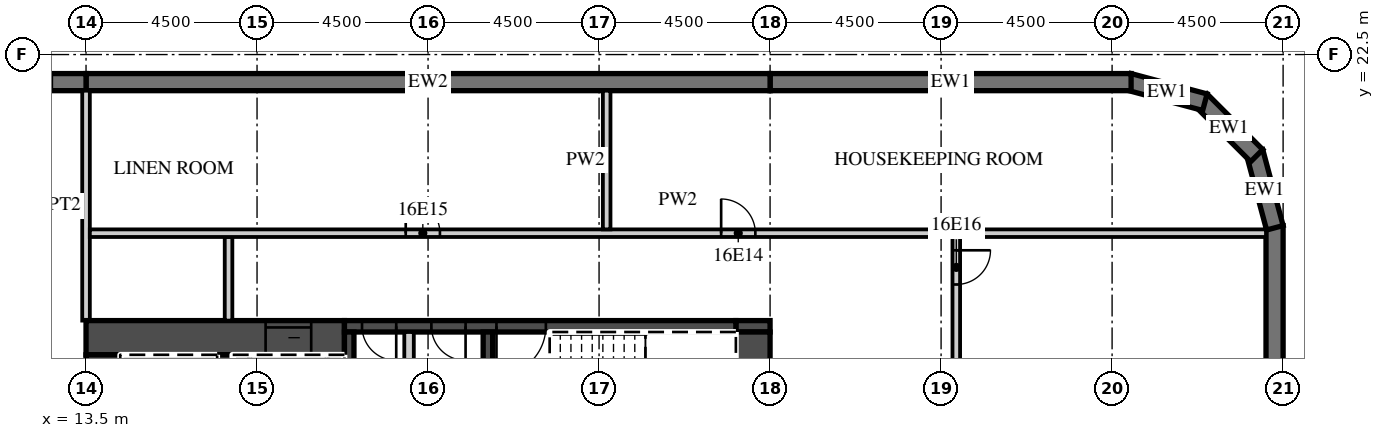
"""IFC4 building model, lengths in metres.
Left out: names, types, materials, properties, quantities, classifications, styles, units other than length and angle.
Written with IfcOpenShell. Run it as: python <this file> out.ifc"""

import sys

from ifc_helpers import new_model, si_unit, direction, frame, frame_2d, origin, place, context, subcontext, project, spatial, polyline, rectangle, outline, extrude, element, fill, save


model = new_model("IFC4")
c1 = context("Model", 3, precision=1e-05, world=origin(), true_north=direction((0.0, 1.0)))
c2 = subcontext(c1, "Body", "Model", "MODEL_VIEW")
j1 = project(units=[si_unit("LENGTHUNIT", "METRE"), si_unit("PLANEANGLEUNIT", "RADIAN")], contexts=[c1])
p1 = place(None, origin())
s1 = spatial("IfcSite", under=j1, at=p1, CompositionType="ELEMENT")
p2 = place(p1, origin())
s2 = spatial("IfcBuilding", under=s1, at=p2, CompositionType="ELEMENT")
p3 = place(p2, frame((0.0, 0.0, 83.1)))
s3 = spatial("IfcBuildingStorey", under=s2, at=p3, CompositionType="ELEMENT", Elevation=83.1)
p4 = place(p3, frame((44.775, -18.0, 0.0), z_axis=(0.0, 0.0, 1.0), x_axis=(0.0, 1.0, 0.0)))
e1 = element("IfcWall", 1, at=p4, inside=s3, PredefinedType="SOLIDWALL", context=c2, shape_type="SweptSolid", body=[
    extrude(rectangle(XDim=36.0, YDim=0.45, at=frame_2d((18.0, 0.0))), origin(), (0.0, 0.0, 1.0), 3.02),
])
p5 = place(p4, frame((3.9, 0.0, 0.45)))
e2 = element("IfcOpeningElement", 2, at=p5, cuts=e1, PredefinedType="OPENING", context=c2, shape_type="SweptSolid", body=[
    extrude(rectangle(XDim=3.3, YDim=2.25, at=frame_2d((1.65, 1.125))), frame((0.0, 0.235, 0.0), z_axis=(0.0, -1.0, 0.0), x_axis=(1.0, 0.0, 0.0)), (0.0, 0.0, 1.0), 0.47),
])
p6 = place(p4, frame((8.4, 0.0, 0.45)))
e3 = element("IfcOpeningElement", 3, at=p6, cuts=e1, PredefinedType="OPENING", context=c2, shape_type="SweptSolid", body=[
    extrude(rectangle(XDim=3.3, YDim=2.25, at=frame_2d((1.65, 1.125))), frame((0.0, 0.235, 0.0), z_axis=(0.0, -1.0, 0.0), x_axis=(1.0, 0.0, 0.0)), (0.0, 0.0, 1.0), 0.47),
])
p7 = place(p4, frame((12.9, 0.0, 0.45)))
e4 = element("IfcOpeningElement", 4, at=p7, cuts=e1, PredefinedType="OPENING", context=c2, shape_type="SweptSolid", body=[
    extrude(rectangle(XDim=3.3, YDim=2.25, at=frame_2d((1.65, 1.125))), frame((0.0, 0.235, 0.0), z_axis=(0.0, -1.0, 0.0), x_axis=(1.0, 0.0, 0.0)), (0.0, 0.0, 1.0), 0.47),
])
p8 = place(p3, frame((44.783, 17.942, 0.0), z_axis=(0.0, 0.0, 1.0), x_axis=(-0.25881466832, 0.965926999034, 0.0)))
e5 = element("IfcWall", 5, at=p8, inside=s3, PredefinedType="SOLIDWALL", context=c2, shape_type="SweptSolid", body=[
    extrude(outline(polyline([(0.0, -0.225), (2.071, -0.225), (1.95, 0.225), (0.121, 0.225), (0.0, -0.225)])), origin(), (0.0, 0.0, 1.0), 3.02),
])
p9 = place(p3, frame((44.305, 19.841, 0.0), z_axis=(0.0, 0.0, 1.0), x_axis=(-0.707106781187, 0.707106781187, 0.0)))
e6 = element("IfcWall", 6, at=p9, inside=s3, PredefinedType="SOLIDWALL", context=c2, shape_type="SweptSolid", body=[
    extrude(outline(polyline([(0.0, -0.225), (2.071, -0.225), (1.95, 0.225), (0.121, 0.225), (0.0, -0.225)])), origin(), (0.0, 0.0, 1.0), 3.02),
])
p10 = place(p3, frame((42.942, 21.247, 0.0), z_axis=(0.0, 0.0, 1.0), x_axis=(-0.965926999034, 0.25881466832, 0.0)))
e7 = element("IfcWall", 7, at=p10, inside=s3, PredefinedType="SOLIDWALL", context=c2, shape_type="SweptSolid", body=[
    extrude(outline(polyline([(-0.0, -0.225), (2.07, -0.225), (1.95, 0.225), (0.12, 0.225), (-0.0, -0.225)])), origin(), (0.0, 0.0, 1.0), 3.02),
])
p11 = place(p3, frame((41.0, 21.775, 0.0), z_axis=(0.0, 0.0, 1.0), x_axis=(-1.0, 0.0, 0.0)))
e8 = element("IfcWall", 8, at=p11, inside=s3, PredefinedType="SOLIDWALL", context=c2, shape_type="SweptSolid", body=[
    extrude(rectangle(XDim=9.5, YDim=0.45, at=frame_2d((4.75, 0.0))), origin(), (0.0, 0.0, 1.0), 3.02),
])
p12 = place(p3, frame((31.5, 21.775, 0.0), z_axis=(0.0, 0.0, 1.0), x_axis=(-1.0, 0.0, 0.0)))
e9 = element("IfcWall", 9, at=p12, inside=s3, PredefinedType="SOLIDWALL", context=c2, shape_type="SweptSolid", body=[
    extrude(rectangle(XDim=18.0, YDim=0.45, at=frame_2d((9.0, 0.0))), origin(), (0.0, 0.0, 1.0), 3.02),
])
p13 = place(p3, frame((13.5, 21.775, 0.0), z_axis=(0.0, 0.0, 1.0), x_axis=(-1.0, 0.0, 0.0)))
e10 = element("IfcWall", 10, at=p13, inside=s3, PredefinedType="SOLIDWALL", context=c2, shape_type="SweptSolid", body=[
    extrude(rectangle(XDim=54.5, YDim=0.45, at=frame_2d((27.25, 0.0))), origin(), (0.0, 0.0, 1.0), 3.02),
])
p14 = place(p13, frame((0.9, 0.0, 0.45)))
e11 = element("IfcOpeningElement", 11, at=p14, cuts=e10, PredefinedType="OPENING", context=c2, shape_type="SweptSolid", body=[
    extrude(rectangle(XDim=2.7, YDim=2.25, at=frame_2d((1.35, 1.125))), frame((0.0, 0.235, 0.0), z_axis=(0.0, -1.0, 0.0), x_axis=(1.0, 0.0, 0.0)), (0.0, 0.0, 1.0), 0.47),
])
p15 = place(p13, frame((5.4, 0.0, 0.45)))
e12 = element("IfcOpeningElement", 12, at=p15, cuts=e10, PredefinedType="OPENING", context=c2, shape_type="SweptSolid", body=[
    extrude(rectangle(XDim=2.7, YDim=2.25, at=frame_2d((1.35, 1.125))), frame((0.0, 0.235, 0.0), z_axis=(0.0, -1.0, 0.0), x_axis=(1.0, 0.0, 0.0)), (0.0, 0.0, 1.0), 0.47),
])
p16 = place(p13, frame((9.9, 0.0, 0.45)))
e13 = element("IfcOpeningElement", 13, at=p16, cuts=e10, PredefinedType="OPENING", context=c2, shape_type="SweptSolid", body=[
    extrude(rectangle(XDim=2.7, YDim=2.25, at=frame_2d((1.35, 1.125))), frame((0.0, 0.235, 0.0), z_axis=(0.0, -1.0, 0.0), x_axis=(1.0, 0.0, 0.0)), (0.0, 0.0, 1.0), 0.47),
])
p17 = place(p13, frame((14.4, 0.0, 0.45)))
e14 = element("IfcOpeningElement", 14, at=p17, cuts=e10, PredefinedType="OPENING", context=c2, shape_type="SweptSolid", body=[
    extrude(rectangle(XDim=2.7, YDim=2.25, at=frame_2d((1.35, 1.125))), frame((0.0, 0.235, 0.0), z_axis=(0.0, -1.0, 0.0), x_axis=(1.0, 0.0, 0.0)), (0.0, 0.0, 1.0), 0.47),
])
p18 = place(p13, frame((18.9, 0.0, 0.45)))
e15 = element("IfcOpeningElement", 15, at=p18, cuts=e10, PredefinedType="OPENING", context=c2, shape_type="SweptSolid", body=[
    extrude(rectangle(XDim=2.7, YDim=2.25, at=frame_2d((1.35, 1.125))), frame((0.0, 0.235, 0.0), z_axis=(0.0, -1.0, 0.0), x_axis=(1.0, 0.0, 0.0)), (0.0, 0.0, 1.0), 0.47),
])
p19 = place(p13, frame((23.4, 0.0, 0.45)))
e16 = element("IfcOpeningElement", 16, at=p19, cuts=e10, PredefinedType="OPENING", context=c2, shape_type="SweptSolid", body=[
    extrude(rectangle(XDim=2.7, YDim=2.25, at=frame_2d((1.35, 1.125))), frame((0.0, 0.235, 0.0), z_axis=(0.0, -1.0, 0.0), x_axis=(1.0, 0.0, 0.0)), (0.0, 0.0, 1.0), 0.47),
])
p20 = place(p13, frame((27.9, 0.0, 0.45)))
e17 = element("IfcOpeningElement", 17, at=p20, cuts=e10, PredefinedType="OPENING", context=c2, shape_type="SweptSolid", body=[
    extrude(rectangle(XDim=2.7, YDim=2.25, at=frame_2d((1.35, 1.125))), frame((0.0, 0.235, 0.0), z_axis=(0.0, -1.0, 0.0), x_axis=(1.0, 0.0, 0.0)), (0.0, 0.0, 1.0), 0.47),
])
p21 = place(p13, frame((32.4, 0.0, 0.45)))
e18 = element("IfcOpeningElement", 18, at=p21, cuts=e10, PredefinedType="OPENING", context=c2, shape_type="SweptSolid", body=[
    extrude(rectangle(XDim=2.7, YDim=2.25, at=frame_2d((1.35, 1.125))), frame((0.0, 0.235, 0.0), z_axis=(0.0, -1.0, 0.0), x_axis=(1.0, 0.0, 0.0)), (0.0, 0.0, 1.0), 0.47),
])
p22 = place(p13, frame((36.9, 0.0, 0.45)))
e19 = element("IfcOpeningElement", 19, at=p22, cuts=e10, PredefinedType="OPENING", context=c2, shape_type="SweptSolid", body=[
    extrude(rectangle(XDim=2.7, YDim=2.25, at=frame_2d((1.35, 1.125))), frame((0.0, 0.235, 0.0), z_axis=(0.0, -1.0, 0.0), x_axis=(1.0, 0.0, 0.0)), (0.0, 0.0, 1.0), 0.47),
])
p23 = place(p13, frame((41.4, 0.0, 0.45)))
e20 = element("IfcOpeningElement", 20, at=p23, cuts=e10, PredefinedType="OPENING", context=c2, shape_type="SweptSolid", body=[
    extrude(rectangle(XDim=2.7, YDim=2.25, at=frame_2d((1.35, 1.125))), frame((0.0, 0.235, 0.0), z_axis=(0.0, -1.0, 0.0), x_axis=(1.0, 0.0, 0.0)), (0.0, 0.0, 1.0), 0.47),
])
p24 = place(p13, frame((45.9, 0.0, 0.45)))
e21 = element("IfcOpeningElement", 21, at=p24, cuts=e10, PredefinedType="OPENING", context=c2, shape_type="SweptSolid", body=[
    extrude(rectangle(XDim=2.7, YDim=2.25, at=frame_2d((1.35, 1.125))), frame((0.0, 0.235, 0.0), z_axis=(0.0, -1.0, 0.0), x_axis=(1.0, 0.0, 0.0)), (0.0, 0.0, 1.0), 0.47),
])
p25 = place(p13, frame((50.4, 0.0, 0.45)))
e22 = element("IfcOpeningElement", 22, at=p25, cuts=e10, PredefinedType="OPENING", context=c2, shape_type="SweptSolid", body=[
    extrude(rectangle(XDim=2.7, YDim=2.25, at=frame_2d((1.35, 1.125))), frame((0.0, 0.235, 0.0), z_axis=(0.0, -1.0, 0.0), x_axis=(1.0, 0.0, 0.0)), (0.0, 0.0, 1.0), 0.47),
])
p26 = place(p3, frame((13.5, 15.5, 0.0), z_axis=(0.0, 0.0, 1.0), x_axis=(0.0, 1.0, 0.0)))
e23 = element("IfcWall", 23, at=p26, inside=s3, PredefinedType="PARTITIONING", context=c2, shape_type="SweptSolid", body=[
    extrude(rectangle(XDim=6.05, YDim=0.2, at=frame_2d((3.025, 0.0))), origin(), (0.0, 0.0, 1.0), 3.02),
])
p27 = place(p3, frame((13.5, 15.05, 0.0), z_axis=(0.0, 0.0, 1.0), x_axis=(1.0, 0.0, 0.0)))
e24 = element("IfcWall", 24, at=p27, inside=s3, PredefinedType="SHEAR", context=c2, shape_type="SweptSolid", body=[
    extrude(rectangle(XDim=6.8, YDim=0.9, at=frame_2d((3.4, 0.0))), origin(), (0.0, 0.0, 1.0), 3.02),
])
p28 = place(p27, frame((4.725, 0.0, 0.0)))
e25 = element("IfcOpeningElement", 25, at=p28, cuts=e24, PredefinedType="OPENING", context=c2, shape_type="SweptSolid", body=[
    extrude(rectangle(XDim=1.2, YDim=2.1, at=frame_2d((0.6, 1.05))), frame((0.0, 0.46, 0.0), z_axis=(0.0, -1.0, 0.0), x_axis=(1.0, 0.0, 0.0)), (0.0, 0.0, 1.0), 0.92),
])
p29 = place(p3, frame((30.6, 15.35, 0.0), z_axis=(0.0, 0.0, 1.0), x_axis=(1.0, 0.0, 0.0)))
e26 = element("IfcWall", 26, at=p29, inside=s3, PredefinedType="SHEAR", context=c2, shape_type="SweptSolid", body=[
    extrude(rectangle(XDim=0.9, YDim=0.3, at=frame_2d((0.45, 0.0))), origin(), (0.0, 0.0, 1.0), 3.02),
])
p30 = place(p3, frame((20.3, 15.35, 0.0), z_axis=(0.0, 0.0, 1.0), x_axis=(1.0, 0.0, 0.0)))
e27 = element("IfcWall", 27, at=p30, inside=s3, PredefinedType="SHEAR", context=c2, shape_type="SweptSolid", body=[
    extrude(rectangle(XDim=10.3, YDim=0.3, at=frame_2d((5.15, 0.0))), origin(), (0.0, 0.0, 1.0), 3.02),
])
p31 = place(p30, frame((4.0, 0.0, 0.0)))
e28 = element("IfcOpeningElement", 28, at=p31, cuts=e27, PredefinedType="OPENING", context=c2, shape_type="SweptSolid", body=[
    extrude(rectangle(XDim=1.3, YDim=2.1, at=frame_2d((0.65, 1.05))), frame((0.0, 0.16, 0.0), z_axis=(0.0, -1.0, 0.0), x_axis=(1.0, 0.0, 0.0)), (0.0, 0.0, 1.0), 0.32),
])
p32 = place(p30, frame((2.288, 0.0, 0.0)))
e29 = element("IfcOpeningElement", 29, at=p32, cuts=e27, PredefinedType="OPENING", context=c2, shape_type="SweptSolid", body=[
    extrude(rectangle(XDim=0.9, YDim=2.1, at=frame_2d((0.45, 1.05))), frame((0.0, 0.16, 0.0), z_axis=(0.0, -1.0, 0.0), x_axis=(1.0, 0.0, 0.0)), (0.0, 0.0, 1.0), 0.32),
])
p33 = place(p30, frame((0.462, 0.0, 0.0)))
e30 = element("IfcOpeningElement", 30, at=p33, cuts=e27, PredefinedType="OPENING", context=c2, shape_type="SweptSolid", body=[
    extrude(rectangle(XDim=0.9, YDim=2.1, at=frame_2d((0.45, 1.05))), frame((0.0, 0.16, 0.0), z_axis=(0.0, -1.0, 0.0), x_axis=(1.0, 0.0, 0.0)), (0.0, 0.0, 1.0), 0.32),
])
p34 = place(p3, frame((31.05, 2.4, 0.0), z_axis=(0.0, 0.0, 1.0), x_axis=(0.0, 1.0, 0.0)))
e31 = element("IfcWall", 31, at=p34, inside=s3, PredefinedType="SHEAR", context=c2, shape_type="SweptSolid", body=[
    extrude(rectangle(XDim=12.8, YDim=0.9, at=frame_2d((6.4, 0.0))), origin(), (0.0, 0.0, 1.0), 3.02),
])
p35 = place(p34, frame((0.2, 0.0, 0.0)))
e32 = element("IfcOpeningElement", 32, at=p35, cuts=e31, PredefinedType="OPENING", context=c2, shape_type="SweptSolid", body=[
    extrude(rectangle(XDim=1.1, YDim=2.1, at=frame_2d((0.55, 1.05))), frame((0.0, 0.46, 0.0), z_axis=(0.0, -1.0, 0.0), x_axis=(1.0, 0.0, 0.0)), (0.0, 0.0, 1.0), 0.92),
])
p36 = place(p3, frame((13.95, 2.4, 0.0), z_axis=(0.0, 0.0, 1.0), x_axis=(0.0, 1.0, 0.0)))
e33 = element("IfcWall", 33, at=p36, inside=s3, PredefinedType="SHEAR", context=c2, shape_type="SweptSolid", body=[
    extrude(rectangle(XDim=12.2, YDim=0.9, at=frame_2d((6.1, 0.0))), origin(), (0.0, 0.0, 1.0), 3.02),
])
p37 = place(p3, frame((17.15, 8.8, 0.0), z_axis=(0.0, 0.0, 1.0), x_axis=(0.0, 1.0, 0.0)))
e34 = element("IfcWall", 34, at=p37, inside=s3, PredefinedType="SHEAR", context=c2, shape_type="SweptSolid", body=[
    extrude(rectangle(XDim=5.8, YDim=0.4, at=frame_2d((2.9, 0.0))), origin(), (0.0, 0.0, 1.0), 3.02),
])
for number, where, z_axis, x_axis in (
    (35, (20.425, 11.95, 0.0), (0.0, 0.0, 1.0), (0.0, 1.0, 0.0)),
    (36, (24.075, 11.95, 0.0), (0.0, 0.0, 1.0), (0.0, 1.0, 0.0)),
):
    element("IfcWall", number, at=place(p3, frame(where, z_axis=z_axis, x_axis=x_axis)), inside=s3, PredefinedType="SHEAR", context=c2, shape_type="SweptSolid", body=[
        extrude(rectangle(XDim=3.25, YDim=0.25, at=frame_2d((1.625, 0.0))), origin(), (0.0, 0.0, 1.0), 3.02),
    ])
p38 = place(p3, frame((22.0, 11.95, 0.0), z_axis=(0.0, 0.0, 1.0), x_axis=(0.0, 1.0, 0.0)))
e37 = element("IfcWall", 37, at=p38, inside=s3, PredefinedType="PARTITIONING", context=c2, shape_type="SweptSolid", body=[
    extrude(rectangle(XDim=3.25, YDim=0.25, at=frame_2d((1.625, 0.0))), origin(), (0.0, 0.0, 1.0), 3.02),
])
p39 = place(p3, frame((17.25, 15.5, 0.0), z_axis=(0.0, 0.0, 1.0), x_axis=(0.0, 1.0, 0.0)))
e38 = element("IfcWall", 38, at=p39, inside=s3, PredefinedType="PARTITIONING", context=c2, shape_type="SweptSolid", body=[
    extrude(rectangle(XDim=2.2, YDim=0.2, at=frame_2d((1.1, 0.0))), origin(), (0.0, 0.0, 1.0), 3.02),
])
p40 = place(p3, frame((36.4, 1.75, 0.0), z_axis=(0.0, 0.0, 1.0), x_axis=(0.0, 1.0, 0.0)))
e39 = element("IfcWall", 39, at=p40, inside=s3, PredefinedType="PARTITIONING", context=c2, shape_type="SweptSolid", body=[
    extrude(rectangle(XDim=15.95, YDim=0.2, at=frame_2d((7.975, 0.0))), origin(), (0.0, 0.0, 1.0), 3.02),
])
p41 = place(p40, frame((14.7, 0.0, 0.0)))
e40 = element("IfcOpeningElement", 40, at=p41, cuts=e39, PredefinedType="OPENING", context=c2, shape_type="SweptSolid", body=[
    extrude(rectangle(XDim=0.9, YDim=2.1, at=frame_2d((0.45, 1.05))), frame((0.0, 0.11, 0.0), z_axis=(0.0, -1.0, 0.0), x_axis=(1.0, 0.0, 0.0)), (0.0, 0.0, 1.0), 0.22),
])
p42 = place(p3, frame((13.6, 17.8, 0.0), z_axis=(0.0, 0.0, 1.0), x_axis=(1.0, 0.0, 0.0)))
e41 = element("IfcWall", 41, at=p42, inside=s3, PredefinedType="PARTITIONING", context=c2, shape_type="SweptSolid", body=[
    extrude(rectangle(XDim=30.95, YDim=0.2, at=frame_2d((15.475, 0.0))), origin(), (0.0, 0.0, 1.0), 3.02),
])
p43 = place(p42, frame((16.613, 0.0, 0.0)))
e42 = element("IfcOpeningElement", 42, at=p43, cuts=e41, PredefinedType="OPENING", context=c2, shape_type="SweptSolid", body=[
    extrude(rectangle(XDim=0.9, YDim=2.1, at=frame_2d((0.45, 1.05))), frame((0.0, 0.11, 0.0), z_axis=(0.0, -1.0, 0.0), x_axis=(1.0, 0.0, 0.0)), (0.0, 0.0, 1.0), 0.22),
])
p44 = place(p42, frame((8.312, 0.0, 0.0)))
e43 = element("IfcOpeningElement", 43, at=p44, cuts=e41, PredefinedType="OPENING", context=c2, shape_type="SweptSolid", body=[
    extrude(rectangle(XDim=0.9, YDim=2.1, at=frame_2d((0.45, 1.05))), frame((0.0, 0.11, 0.0), z_axis=(0.0, -1.0, 0.0), x_axis=(1.0, 0.0, 0.0)), (0.0, 0.0, 1.0), 0.22),
])
p45 = place(p3, frame((27.2, 17.9, 0.0), z_axis=(0.0, 0.0, 1.0), x_axis=(0.0, 1.0, 0.0)))
e44 = element("IfcWall", 44, at=p45, inside=s3, PredefinedType="PARTITIONING", context=c2, shape_type="SweptSolid", body=[
    extrude(rectangle(XDim=3.65, YDim=0.2, at=frame_2d((1.825, 0.0))), origin(), (0.0, 0.0, 1.0), 3.02),
])
p46 = place(p28, origin())
e45 = element("IfcDoor", 45, at=p46, inside=s3, OperationType="SLIDING_TO_LEFT", PredefinedType="DOOR", context=c2, shape_type="SweptSolid", body=[
    extrude(rectangle(XDim=1.2, YDim=2.1, at=frame_2d((0.6, 1.05))), frame((0.0, 0.025, 0.0), z_axis=(0.0, -1.0, 0.0), x_axis=(1.0, 0.0, 0.0)), (0.0, 0.0, 1.0), 0.05),
])
fill(e25, e45)
p47 = place(p31, origin())
e46 = element("IfcDoor", 46, at=p47, inside=s3, OperationType="SINGLE_SWING_LEFT", PredefinedType="DOOR", context=c2, shape_type="SweptSolid", body=[
    extrude(rectangle(XDim=1.3, YDim=2.1, at=frame_2d((0.65, 1.05))), frame((0.0, 0.025, 0.0), z_axis=(0.0, -1.0, 0.0), x_axis=(1.0, 0.0, 0.0)), (0.0, 0.0, 1.0), 0.05),
])
fill(e28, e46)
p48 = place(p32, origin())
e47 = element("IfcDoor", 47, at=p48, inside=s3, OperationType="SINGLE_SWING_RIGHT", PredefinedType="DOOR", context=c2, shape_type="SweptSolid", body=[
    extrude(rectangle(XDim=0.9, YDim=2.1, at=frame_2d((0.45, 1.05))), frame((0.0, 0.025, 0.0), z_axis=(0.0, -1.0, 0.0), x_axis=(1.0, 0.0, 0.0)), (0.0, 0.0, 1.0), 0.05),
])
fill(e29, e47)
p49 = place(p33, origin())
e48 = element("IfcDoor", 48, at=p49, inside=s3, OperationType="SINGLE_SWING_RIGHT", PredefinedType="DOOR", context=c2, shape_type="SweptSolid", body=[
    extrude(rectangle(XDim=0.9, YDim=2.1, at=frame_2d((0.45, 1.05))), frame((0.0, 0.025, 0.0), z_axis=(0.0, -1.0, 0.0), x_axis=(1.0, 0.0, 0.0)), (0.0, 0.0, 1.0), 0.05),
])
fill(e30, e48)
p50 = place(p43, origin())
e49 = element("IfcDoor", 49, at=p50, inside=s3, OperationType="SINGLE_SWING_LEFT", PredefinedType="DOOR", context=c2, shape_type="SweptSolid", body=[
    extrude(rectangle(XDim=0.9, YDim=2.1, at=frame_2d((0.45, 1.05))), frame((0.0, 0.025, 0.0), z_axis=(0.0, -1.0, 0.0), x_axis=(1.0, 0.0, 0.0)), (0.0, 0.0, 1.0), 0.05),
])
fill(e42, e49)
p51 = place(p44, origin())
e50 = element("IfcDoor", 50, at=p51, inside=s3, OperationType="SINGLE_SWING_LEFT", PredefinedType="DOOR", context=c2, shape_type="SweptSolid", body=[
    extrude(rectangle(XDim=0.9, YDim=2.1, at=frame_2d((0.45, 1.05))), frame((0.0, 0.025, 0.0), z_axis=(0.0, -1.0, 0.0), x_axis=(1.0, 0.0, 0.0)), (0.0, 0.0, 1.0), 0.05),
])
fill(e43, e50)
p52 = place(p41, origin())
e51 = element("IfcDoor", 51, at=p52, inside=s3, OperationType="SINGLE_SWING_RIGHT", PredefinedType="DOOR", context=c2, shape_type="SweptSolid", body=[
    extrude(rectangle(XDim=0.9, YDim=2.1, at=frame_2d((0.45, 1.05))), frame((0.0, 0.025, 0.0), z_axis=(0.0, -1.0, 0.0), x_axis=(1.0, 0.0, 0.0)), (0.0, 0.0, 1.0), 0.05),
])
fill(e40, e51)
save(model, sys.argv[1])
